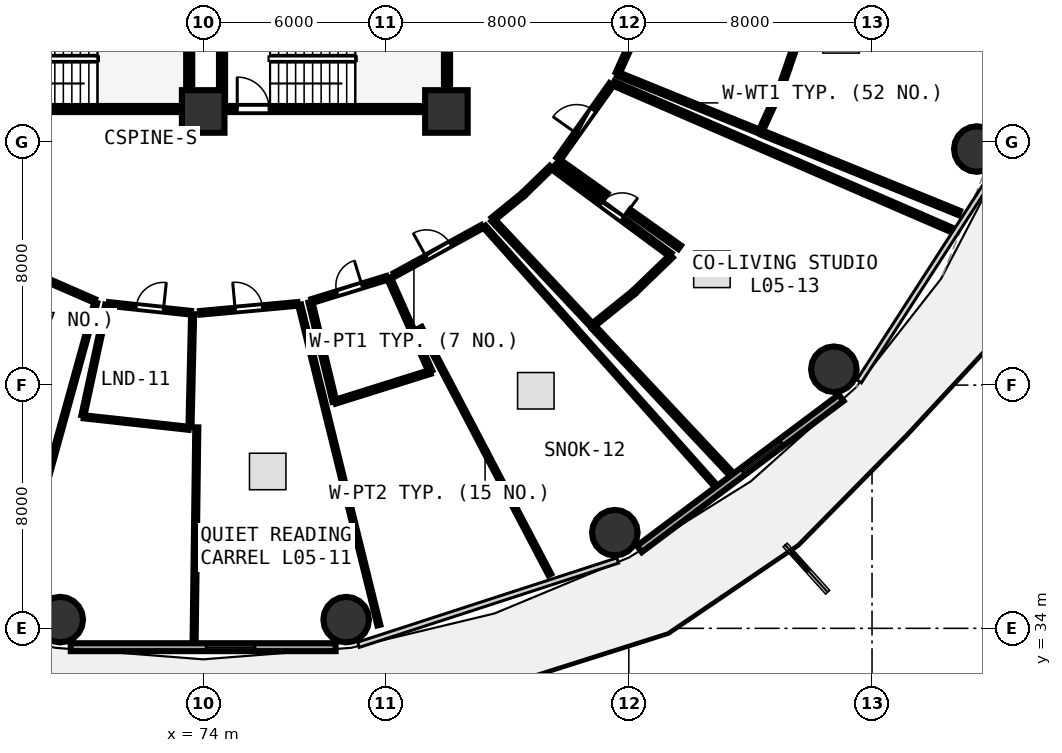
"""IFC4 building model, lengths in metres.
Left out: names, types, materials, properties, quantities, classifications, styles, units other than length and angle.
Written with IfcOpenShell. Run it as: python <this file> out.ifc"""

import sys

from ifc_helpers import new_model, si_unit, direction, frame, frame_2d, origin, origin_2d, place, context, subcontext, project, spatial, rectangle, circle, extrude, element, fill, save


model = new_model("IFC4")
c1 = context("Model", 3, precision=1e-05, world=origin(), true_north=direction((0.0, 1.0)))
c2 = subcontext(c1, "Body", "Model", "MODEL_VIEW")
j1 = project(units=[si_unit("LENGTHUNIT", "METRE"), si_unit("PLANEANGLEUNIT", "RADIAN")], contexts=[c1])
p1 = place(None, origin())
s1 = spatial("IfcSite", under=j1, at=p1, CompositionType="ELEMENT")
p2 = place(p1, origin())
s2 = spatial("IfcBuilding", under=s1, at=p2, CompositionType="ELEMENT")
p3 = place(p2, frame((0.0, 0.0, 22.5)))
s3 = spatial("IfcBuildingStorey", under=s2, at=p3, CompositionType="ELEMENT", Elevation=22.5)
for number, where, z_axis, x_axis in (
    (1, (74.0, 51.0, 0.0), (0.0, 0.0, 1.0), (1.0, 0.0, 0.0)),
    (2, (82.0, 51.0, 0.0), (0.0, 0.0, 1.0), (1.0, 0.0, 0.0)),
):
    element("IfcColumn", number, at=place(p3, frame(where, z_axis=z_axis, x_axis=x_axis)), inside=s3, PredefinedType="PILASTER", context=c2, shape_type="SweptSolid", body=[
        extrude(rectangle(XDim=1.4, YDim=1.4, at=origin_2d()), origin(), (0.0, 0.0, 1.0), 3.75),
    ])
for number, where, z_axis, x_axis in (
    (3, (69.298, 34.286, 0.0), (0.0, 0.0, 1.0), (1.0, 0.0, 0.0)),
    (4, (78.702, 34.286, 0.0), (0.0, 0.0, 1.0), (1.0, 0.0, 0.0)),
    (5, (87.54, 37.146, 0.0), (0.0, 0.0, 1.0), (1.0, 0.0, 0.0)),
    (6, (94.744, 42.522, 0.0), (0.0, 0.0, 1.0), (1.0, 0.0, 0.0)),
    (7, (99.447, 49.764, 0.0), (0.0, 0.0, 1.0), (1.0, 0.0, 0.0)),
):
    element("IfcColumn", number, at=place(p3, frame(where, z_axis=z_axis, x_axis=x_axis)), inside=s3, PredefinedType="COLUMN", context=c2, shape_type="SweptSolid", body=[
        extrude(circle(Radius=0.75, at=origin_2d()), origin(), (0.0, 0.0, 1.0), 3.75),
    ])
p4 = place(p3, frame((69.644, 33.38, 0.0), z_axis=(0.0, 0.0, 1.0), x_axis=(1.0, 0.0, 0.0)))
e8 = element("IfcWall", 8, at=p4, inside=s3, PredefinedType="SOLIDWALL", context=c2, shape_type="SweptSolid", body=[
    extrude(rectangle(XDim=8.712, YDim=0.26, at=frame_2d((4.356, 0.0))), origin(), (0.0, 0.0, 1.0), 3.475),
])
p5 = place(p4, frame((4.456, 0.0, 0.85)))
e9 = element("IfcOpeningElement", 9, at=p5, cuts=e8, PredefinedType="OPENING", context=c2, shape_type="SweptSolid", body=[
    extrude(rectangle(XDim=1.6, YDim=1.45, at=frame_2d((0.8, 0.725))), frame((0.0, 0.14, 0.0), z_axis=(0.0, -1.0, 0.0), x_axis=(1.0, 0.0, 0.0)), (0.0, 0.0, 1.0), 0.28),
])
p6 = place(p3, frame((88.349, 36.611, 0.0), z_axis=(0.0, 0.0, 1.0), x_axis=(0.80030733173, 0.599590005569, 0.0)))
e10 = element("IfcWall", 10, at=p6, inside=s3, PredefinedType="SOLIDWALL", context=c2, shape_type="SweptSolid", body=[
    extrude(rectangle(XDim=8.291, YDim=0.26, at=frame_2d((4.145, 0.0))), origin(), (0.0, 0.0, 1.0), 3.475),
])
p7 = place(p6, frame((4.245, 0.0, 0.85)))
e11 = element("IfcOpeningElement", 11, at=p7, cuts=e10, PredefinedType="OPENING", context=c2, shape_type="SweptSolid", body=[
    extrude(rectangle(XDim=1.6, YDim=1.45, at=frame_2d((0.8, 0.725))), frame((0.0, 0.14, 0.0), z_axis=(0.0, -1.0, 0.0), x_axis=(1.0, 0.0, 0.0)), (0.0, 0.0, 1.0), 0.28),
])
p8 = place(p3, frame((74.0, 51.08, 0.0), z_axis=(0.0, 0.0, 1.0), x_axis=(1.0, 0.0, 0.0)))
e12 = element("IfcWall", 12, at=p8, inside=s3, PredefinedType="SHEAR", context=c2, shape_type="SweptSolid", body=[
    extrude(rectangle(XDim=7.9, YDim=0.2, at=frame_2d((3.95, 0.0))), origin(), (0.0, 0.0, 1.0), 3.49),
])
p9 = place(p8, frame((1.12, 0.0, 0.0)))
e13 = element("IfcOpeningElement", 13, at=p9, cuts=e12, PredefinedType="OPENING", context=c2, shape_type="SweptSolid", body=[
    extrude(rectangle(XDim=1.05, YDim=2.1, at=frame_2d((0.525, 1.05))), frame((0.0, 0.11, 0.0), z_axis=(0.0, -1.0, 0.0), x_axis=(1.0, 0.0, 0.0)), (0.0, 0.0, 1.0), 0.22),
])
for number, where, z_axis, x_axis in (
    (14, (82.02, 51.2, 0.0), (0.0, 0.0, 1.0), (0.0, 1.0, 0.0)),
    (15, (74.62, 54.27, 0.0), (0.0, 0.0, 1.0), (0.0, -1.0, 0.0)),
):
    element("IfcWall", number, at=place(p3, frame(where, z_axis=z_axis, x_axis=x_axis)), inside=s3, PredefinedType="SHEAR", context=c2, shape_type="SweptSolid", body=[
        extrude(rectangle(XDim=3.07, YDim=0.2, at=frame_2d((1.535, 0.0))), origin(), (0.0, 0.0, 1.0), 3.49),
    ])
p10 = place(p3, frame((66.26, 51.08, 0.0), z_axis=(0.0, 0.0, 1.0), x_axis=(1.0, 0.0, 0.0)))
e16 = element("IfcWall", 16, at=p10, inside=s3, PredefinedType="SHEAR", context=c2, shape_type="SweptSolid", body=[
    extrude(rectangle(XDim=7.16, YDim=0.2, at=frame_2d((3.58, 0.0))), origin(), (0.0, 0.0, 1.0), 3.49),
])
p11 = place(p3, frame((73.54, 51.2, 0.0), z_axis=(0.0, 0.0, 1.0), x_axis=(0.0, 1.0, 0.0)))
e17 = element("IfcWall", 17, at=p11, inside=s3, PredefinedType="SHEAR", context=c2, shape_type="SweptSolid", body=[
    extrude(rectangle(XDim=3.07, YDim=0.2, at=frame_2d((1.535, 0.0))), origin(), (0.0, 0.0, 1.0), 3.49),
])
p12 = place(p3, frame((64.828, 47.217, 0.0), z_axis=(0.0, 0.0, 1.0), x_axis=(0.916419655578, -0.400218708797, 0.0)))
e18 = element("IfcWall", 18, at=p12, inside=s3, PredefinedType="PARTITIONING", context=c2, shape_type="SweptSolid", body=[
    extrude(rectangle(XDim=6.104, YDim=0.12, at=frame_2d((3.052, 0.0))), origin(), (0.0, 0.0, 1.0), 2.875),
])
p13 = place(p12, frame((2.602, 0.0, 0.0)))
e19 = element("IfcOpeningElement", 19, at=p13, cuts=e18, PredefinedType="OPENING", context=c2, shape_type="SweptSolid", body=[
    extrude(rectangle(XDim=0.9, YDim=2.08, at=frame_2d((0.45, 1.04))), frame((0.0, 0.07, 0.0), z_axis=(0.0, -1.0, 0.0), x_axis=(1.0, 0.0, 0.0)), (0.0, 0.0, 1.0), 0.14),
])
p14 = place(p3, frame((70.895, 44.67, 0.0), z_axis=(0.0, 0.0, 1.0), x_axis=(0.994302004983, -0.106599825921, 0.0)))
e20 = element("IfcWall", 20, at=p14, inside=s3, PredefinedType="PARTITIONING", context=c2, shape_type="SweptSolid", body=[
    extrude(rectangle(XDim=2.714, YDim=0.12, at=frame_2d((1.357, 0.0))), origin(), (0.0, 0.0, 1.0), 3.235),
])
p15 = place(p14, frame((0.907, 0.0, 0.0)))
e21 = element("IfcOpeningElement", 21, at=p15, cuts=e20, PredefinedType="OPENING", context=c2, shape_type="SweptSolid", body=[
    extrude(rectangle(XDim=0.9, YDim=2.08, at=frame_2d((0.45, 1.04))), frame((0.0, 0.07, 0.0), z_axis=(0.0, -1.0, 0.0), x_axis=(1.0, 0.0, 0.0)), (0.0, 0.0, 1.0), 0.14),
])
p16 = place(p3, frame((73.897, 44.376, 0.0), z_axis=(0.0, 0.0, 1.0), x_axis=(0.995829610124, 0.091232601628, 0.0)))
e22 = element("IfcWall", 22, at=p16, inside=s3, PredefinedType="PARTITIONING", context=c2, shape_type="SweptSolid", body=[
    extrude(rectangle(XDim=3.222, YDim=0.12, at=frame_2d((1.611, 0.0))), origin(), (0.0, 0.0, 1.0), 3.235),
])
p17 = place(p16, frame((1.161, 0.0, 0.0)))
e23 = element("IfcOpeningElement", 23, at=p17, cuts=e22, PredefinedType="OPENING", context=c2, shape_type="SweptSolid", body=[
    extrude(rectangle(XDim=0.9, YDim=2.08, at=frame_2d((0.45, 1.04))), frame((0.0, 0.07, 0.0), z_axis=(0.0, -1.0, 0.0), x_axis=(1.0, 0.0, 0.0)), (0.0, 0.0, 1.0), 0.14),
])
p18 = place(p3, frame((77.58, 44.768, 0.0), z_axis=(0.0, 0.0, 1.0), x_axis=(0.955754448098, 0.294165659011, 0.0)))
e24 = element("IfcWall", 24, at=p18, inside=s3, PredefinedType="PLUMBINGWALL", context=c2, shape_type="SweptSolid", body=[
    extrude(rectangle(XDim=2.579, YDim=0.13, at=frame_2d((1.29, 0.0))), origin(), (0.0, 0.0, 1.0), 3.235),
])
p19 = place(p18, frame((0.86, 0.0, 0.0)))
e25 = element("IfcOpeningElement", 25, at=p19, cuts=e24, PredefinedType="OPENING", context=c2, shape_type="SweptSolid", body=[
    extrude(rectangle(XDim=0.86, YDim=2.05, at=frame_2d((0.43, 1.025))), frame((0.0, 0.075, 0.0), z_axis=(0.0, -1.0, 0.0), x_axis=(1.0, 0.0, 0.0)), (0.0, 0.0, 1.0), 0.15),
])
p20 = place(p3, frame((80.299, 45.632, 0.0), z_axis=(0.0, 0.0, 1.0), x_axis=(0.876387079092, 0.481607399861, 0.0)))
e26 = element("IfcWall", 26, at=p20, inside=s3, PredefinedType="PARTITIONING", context=c2, shape_type="SweptSolid", body=[
    extrude(rectangle(XDim=3.281, YDim=0.12, at=frame_2d((1.641, 0.0))), origin(), (0.0, 0.0, 1.0), 2.875),
])
p21 = place(p20, frame((1.191, 0.0, 0.0)))
e27 = element("IfcOpeningElement", 27, at=p21, cuts=e26, PredefinedType="OPENING", context=c2, shape_type="SweptSolid", body=[
    extrude(rectangle(XDim=0.9, YDim=2.08, at=frame_2d((0.45, 1.04))), frame((0.0, 0.07, 0.0), z_axis=(0.0, -1.0, 0.0), x_axis=(1.0, 0.0, 0.0)), (0.0, 0.0, 1.0), 0.14),
])
p22 = place(p3, frame((85.506, 49.143, 0.0), z_axis=(0.0, 0.0, 1.0), x_axis=(0.80412644244, -0.594458295063, 0.0)))
e28 = element("IfcWall", 28, at=p22, inside=s3, PredefinedType="PLUMBINGWALL", context=c2, shape_type="SweptSolid", body=[
    extrude(rectangle(XDim=4.799, YDim=0.13, at=frame_2d((2.399, 0.0))), origin(), (0.0, 0.0, 1.0), 2.875),
])
p23 = place(p22, frame((1.969, 0.0, 0.0)))
e29 = element("IfcOpeningElement", 29, at=p23, cuts=e28, PredefinedType="OPENING", context=c2, shape_type="SweptSolid", body=[
    extrude(rectangle(XDim=0.86, YDim=2.05, at=frame_2d((0.43, 1.025))), frame((0.0, 0.075, 0.0), z_axis=(0.0, -1.0, 0.0), x_axis=(1.0, 0.0, 0.0)), (0.0, 0.0, 1.0), 0.15),
])
p24 = place(p3, frame((85.686, 49.438, 0.0), z_axis=(0.0, 0.0, 1.0), x_axis=(0.579107689823, 0.815251055557, 0.0)))
e30 = element("IfcWall", 30, at=p24, inside=s3, PredefinedType="PARTITIONING", context=c2, shape_type="SweptSolid", body=[
    extrude(rectangle(XDim=3.005, YDim=0.15, at=frame_2d((1.503, 0.0))), origin(), (0.0, 0.0, 1.0), 2.875),
])
p25 = place(p24, frame((1.028, 0.0, 0.0)))
e31 = element("IfcOpeningElement", 31, at=p25, cuts=e30, PredefinedType="OPENING", context=c2, shape_type="SweptSolid", body=[
    extrude(rectangle(XDim=0.95, YDim=2.08, at=frame_2d((0.475, 1.04))), frame((0.0, 0.085, 0.0), z_axis=(0.0, -1.0, 0.0), x_axis=(1.0, 0.0, 0.0)), (0.0, 0.0, 1.0), 0.17),
])
p26 = place(p3, frame((70.466, 44.711, 0.0), z_axis=(0.0, 0.0, 1.0), x_axis=(-0.26671307518, -0.963775977875, 0.0)))
e32 = element("IfcWall", 32, at=p26, inside=s3, PredefinedType="PARTITIONING", context=c2, shape_type="SweptSolid", body=[
    extrude(rectangle(XDim=10.865, YDim=0.1, at=frame_2d((5.432, 0.0))), origin(), (0.0, 0.0, 1.0), 2.875),
])
p27 = place(p3, frame((73.652, 44.334, 0.0), z_axis=(0.0, 0.0, 1.0), x_axis=(-0.02316715399, -0.99973160547, 0.0)))
e33 = element("IfcWall", 33, at=p27, inside=s3, PredefinedType="PARTITIONING", context=c2, shape_type="SweptSolid", body=[
    extrude(rectangle(XDim=3.72, YDim=0.1, at=frame_2d((1.86, 0.0))), origin(), (0.0, 0.0, 1.0), 3.175),
])
p28 = place(p3, frame((73.525, 40.579, 0.0), z_axis=(0.0, 0.0, 1.0), x_axis=(-0.994070147468, 0.108740709544, 0.0)))
e34 = element("IfcWall", 34, at=p28, inside=s3, PredefinedType="PARTITIONING", context=c2, shape_type="SweptSolid", body=[
    extrude(rectangle(XDim=3.471, YDim=0.1, at=frame_2d((1.735, 0.0))), origin(), (0.0, 0.0, 1.0), 3.175),
])
p29 = place(p3, frame((70.043, 41.0, 0.0), z_axis=(0.0, 0.0, 1.0), x_axis=(0.210519412271, 0.977589677246, 0.0)))
e35 = element("IfcWall", 35, at=p29, inside=s3, PredefinedType="PARTITIONING", context=c2, shape_type="SweptSolid", body=[
    extrude(rectangle(XDim=3.72, YDim=0.1, at=frame_2d((1.86, 0.0))), origin(), (0.0, 0.0, 1.0), 3.175),
])
p30 = place(p3, frame((77.175, 44.637, 0.0), z_axis=(0.0, 0.0, 1.0), x_axis=(0.239971369295, -0.970779965759, 0.0)))
e36 = element("IfcWall", 36, at=p30, inside=s3, PredefinedType="PARTITIONING", context=c2, shape_type="SweptSolid", body=[
    extrude(rectangle(XDim=10.846, YDim=0.1, at=frame_2d((5.423, 0.0))), origin(), (0.0, 0.0, 1.0), 2.875),
])
p31 = place(p3, frame((73.701, 33.561, 0.0), z_axis=(0.0, 0.0, 1.0), x_axis=(0.012537113793, 0.9999214073, 0.0)))
e37 = element("IfcWall", 37, at=p31, inside=s3, PredefinedType="PARTITIONING", context=c2, shape_type="SweptSolid", body=[
    extrude(rectangle(XDim=7.049, YDim=0.1, at=frame_2d((3.525, 0.0))), origin(), (0.0, 0.0, 1.0), 2.875),
])
p32 = place(p3, frame((80.111, 45.526, 0.0), z_axis=(0.0, 0.0, 1.0), x_axis=(0.405936178007, -0.913901427608, 0.0)))
e38 = element("IfcWall", 38, at=p32, inside=s3, PredefinedType="PLUMBINGWALL", context=c2, shape_type="SweptSolid", body=[
    extrude(rectangle(XDim=3.36, YDim=0.13, at=frame_2d((1.68, 0.0))), origin(), (0.0, 0.0, 1.0), 2.875),
])
p33 = place(p3, frame((81.464, 42.431, 0.0), z_axis=(0.0, 0.0, 1.0), x_axis=(-0.954175708416, -0.299246917226, 0.0)))
e39 = element("IfcWall", 39, at=p33, inside=s3, PredefinedType="PLUMBINGWALL", context=c2, shape_type="SweptSolid", body=[
    extrude(rectangle(XDim=3.275, YDim=0.13, at=frame_2d((1.637, 0.0))), origin(), (0.0, 0.0, 1.0), 2.875),
])
p34 = place(p3, frame((78.315, 41.464, 0.0), z_axis=(0.0, 0.0, 1.0), x_axis=(-0.234406131581, 0.972138758345, 0.0)))
e40 = element("IfcWall", 40, at=p34, inside=s3, PredefinedType="PLUMBINGWALL", context=c2, shape_type="SweptSolid", body=[
    extrude(rectangle(XDim=3.36, YDim=0.13, at=frame_2d((1.68, 0.0))), origin(), (0.0, 0.0, 1.0), 3.235),
])
p35 = place(p3, frame((83.254, 47.211, 0.0), z_axis=(0.0, 0.0, 1.0), x_axis=(0.66580890104, -0.746122313897, 0.0)))
e41 = element("IfcWall", 41, at=p35, inside=s3, PredefinedType="PARTITIONING", context=c2, shape_type="SweptSolid", body=[
    extrude(rectangle(XDim=11.399, YDim=0.1, at=frame_2d((5.7, 0.0))), origin(), (0.0, 0.0, 1.0), 2.875),
])
p36 = place(p3, frame((85.401, 35.769, 0.0), z_axis=(0.0, 0.0, 1.0), x_axis=(-0.464308397246, 0.885673592384, 0.0)))
e42 = element("IfcWall", 42, at=p36, inside=s3, PredefinedType="PARTITIONING", context=c2, shape_type="SweptSolid", body=[
    extrude(rectangle(XDim=9.17, YDim=0.1, at=frame_2d((4.585, 0.0))), origin(), (0.0, 0.0, 1.0), 2.875),
])
p37 = place(p3, frame((83.53, 47.461, 0.0), z_axis=(0.0, 0.0, 1.0), x_axis=(0.77596084644, 0.63078107517, 0.0)))
e43 = element("IfcWall", 43, at=p37, inside=s3, PredefinedType="PLUMBINGWALL", context=c2, shape_type="SweptSolid", body=[
    extrude(rectangle(XDim=1.268, YDim=0.13, at=frame_2d((0.634, 0.0))), origin(), (0.0, 0.0, 1.0), 2.875),
])
p38 = place(p3, frame((84.543, 48.287, 0.0), z_axis=(0.0, 0.0, 1.0), x_axis=(0.715980731769, 0.698120041064, 0.0)))
e44 = element("IfcWall", 44, at=p38, inside=s3, PredefinedType="PLUMBINGWALL", context=c2, shape_type="SweptSolid", body=[
    extrude(rectangle(XDim=1.258, YDim=0.13, at=frame_2d((0.629, 0.0))), origin(), (0.0, 0.0, 1.0), 2.875),
])
p39 = place(p3, frame((89.399, 46.241, 0.0), z_axis=(0.0, 0.0, 1.0), x_axis=(-0.719664402118, -0.694322078234, 0.0)))
e45 = element("IfcWall", 45, at=p39, inside=s3, PredefinedType="PLUMBINGWALL", context=c2, shape_type="SweptSolid", body=[
    extrude(rectangle(XDim=1.696, YDim=0.13, at=frame_2d((0.848, 0.0))), origin(), (0.0, 0.0, 1.0), 2.875),
])
p40 = place(p3, frame((88.148, 45.038, 0.0), z_axis=(0.0, 0.0, 1.0), x_axis=(-0.778806140639, -0.627264693174, 0.0)))
e46 = element("IfcWall", 46, at=p40, inside=s3, PredefinedType="PLUMBINGWALL", context=c2, shape_type="SweptSolid", body=[
    extrude(rectangle(XDim=1.713, YDim=0.13, at=frame_2d((0.856, 0.0))), origin(), (0.0, 0.0, 1.0), 3.175),
])
p41 = place(p3, frame((86.785, 43.966, 0.0), z_axis=(0.0, 0.0, 1.0), x_axis=(-0.68469858897, 0.728826345753, 0.0)))
e47 = element("IfcWall", 47, at=p41, inside=s3, PredefinedType="PLUMBINGWALL", context=c2, shape_type="SweptSolid", body=[
    extrude(rectangle(XDim=4.758, YDim=0.13, at=frame_2d((2.379, 0.0))), origin(), (0.0, 0.0, 1.0), 2.875),
])
p42 = place(p3, frame((87.498, 51.921, 0.0), z_axis=(0.0, 0.0, 1.0), x_axis=(0.917695041134, -0.397285554077, 0.0)))
e48 = element("IfcWall", 48, at=p42, inside=s3, PredefinedType="PARTITIONING", context=c2, shape_type="SweptSolid", body=[
    extrude(rectangle(XDim=12.07, YDim=0.15, at=frame_2d((6.035, 0.0))), origin(), (0.0, 0.0, 1.0), 2.875),
])
p43 = place(p3, frame((91.368, 39.078, 0.0), z_axis=(0.0, 0.0, 1.0), x_axis=(-0.684296653493, 0.729203736975, 0.0)))
e49 = element("IfcWall", 49, at=p43, inside=s3, PredefinedType="PARTITIONING", context=c2, shape_type="SweptSolid", body=[
    extrude(rectangle(XDim=6.6, YDim=0.15, at=frame_2d((3.3, 0.0))), origin(), (0.0, 0.0, 1.0), 2.875),
])
p44 = place(p3, frame((89.671, 46.533, 0.0), z_axis=(0.0, 0.0, 1.0), x_axis=(-0.815281399299, 0.579064970411, 0.0)))
e50 = element("IfcWall", 50, at=p44, inside=s3, PredefinedType="PARTITIONING", context=c2, shape_type="SweptSolid", body=[
    extrude(rectangle(XDim=2.042, YDim=0.15, at=frame_2d((1.021, 0.0))), origin(), (0.0, 0.0, 1.0), 3.48),
])
p45 = place(p3, frame((87.256, 48.249, 0.0), z_axis=(0.0, 0.0, 1.0), x_axis=(-0.815270043711, 0.579080957922, 0.0)))
e51 = element("IfcWall", 51, at=p45, inside=s3, PredefinedType="PARTITIONING", context=c2, shape_type="SweptSolid", body=[
    extrude(rectangle(XDim=1.929, YDim=0.15, at=frame_2d((0.964, 0.0))), origin(), (0.0, 0.0, 1.0), 3.235),
])
p46 = place(p3, frame((87.628, 52.255, 0.0), z_axis=(0.0, 0.0, 1.0), x_axis=(0.4138937247, 0.910325208183, 0.0)))
e52 = element("IfcWall", 52, at=p46, inside=s3, PredefinedType="PLUMBINGWALL", context=c2, shape_type="SweptSolid", body=[
    extrude(rectangle(XDim=1.216, YDim=0.13, at=frame_2d((0.608, 0.0))), origin(), (0.0, 0.0, 1.0), 3.48),
])
p47 = place(p3, frame((93.559, 53.402, 0.0), z_axis=(0.0, 0.0, 1.0), x_axis=(-0.326356647952, -0.945246707657, 0.0)))
e53 = element("IfcWall", 53, at=p47, inside=s3, PredefinedType="PLUMBINGWALL", context=c2, shape_type="SweptSolid", body=[
    extrude(rectangle(XDim=1.624, YDim=0.13, at=frame_2d((0.812, 0.0))), origin(), (0.0, 0.0, 1.0), 3.48),
])
p48 = place(p3, frame((93.014, 51.83, 0.0), z_axis=(0.0, 0.0, 1.0), x_axis=(-0.41762687648, -0.908618617486, 0.0)))
e54 = element("IfcWall", 54, at=p48, inside=s3, PredefinedType="PLUMBINGWALL", context=c2, shape_type="SweptSolid", body=[
    extrude(rectangle(XDim=1.634, YDim=0.13, at=frame_2d((0.817, 0.0))), origin(), (0.0, 0.0, 1.0), 2.875),
])
p49 = place(p3, frame((92.304, 50.334, 0.0), z_axis=(0.0, 0.0, 1.0), x_axis=(-0.926504606816, 0.376283421835, 0.0)))
e55 = element("IfcWall", 55, at=p49, inside=s3, PredefinedType="PLUMBINGWALL", context=c2, shape_type="SweptSolid", body=[
    extrude(rectangle(XDim=5.036, YDim=0.13, at=frame_2d((2.518, 0.0))), origin(), (0.0, 0.0, 1.0), 2.875),
])
p50 = place(p3, frame((98.865, 47.664, 0.0), z_axis=(0.0, 0.0, 1.0), x_axis=(-0.926325178802, 0.376724917038, 0.0)))
e56 = element("IfcWall", 56, at=p50, inside=s3, PredefinedType="PARTITIONING", context=c2, shape_type="SweptSolid", body=[
    extrude(rectangle(XDim=6.983, YDim=0.15, at=frame_2d((3.492, 0.0))), origin(), (0.0, 0.0, 1.0), 2.875),
])
p51 = place(p5, origin())
e57 = element("IfcWindow", 57, at=p51, inside=s3, PartitioningType="SINGLE_PANEL", PredefinedType="WINDOW", context=c2, shape_type="SweptSolid", body=[
    extrude(rectangle(XDim=1.6, YDim=1.45, at=frame_2d((0.8, 0.725))), frame((0.0, 0.03, 0.0), z_axis=(0.0, -1.0, 0.0), x_axis=(1.0, 0.0, 0.0)), (0.0, 0.0, 1.0), 0.06),
])
fill(e9, e57)
p52 = place(p7, origin())
e58 = element("IfcWindow", 58, at=p52, inside=s3, PartitioningType="SINGLE_PANEL", PredefinedType="WINDOW", context=c2, shape_type="SweptSolid", body=[
    extrude(rectangle(XDim=1.6, YDim=1.45, at=frame_2d((0.8, 0.725))), frame((0.0, 0.03, 0.0), z_axis=(0.0, -1.0, 0.0), x_axis=(1.0, 0.0, 0.0)), (0.0, 0.0, 1.0), 0.06),
])
fill(e11, e58)
p53 = place(p9, origin())
e59 = element("IfcDoor", 59, at=p53, inside=s3, OperationType="SINGLE_SWING_LEFT", PredefinedType="DOOR", context=c2, shape_type="SweptSolid", body=[
    extrude(rectangle(XDim=1.05, YDim=2.1, at=frame_2d((0.525, 1.05))), frame((0.0, 0.025, 0.0), z_axis=(0.0, -1.0, 0.0), x_axis=(1.0, 0.0, 0.0)), (0.0, 0.0, 1.0), 0.05),
])
fill(e13, e59)
p54 = place(p15, origin())
e60 = element("IfcDoor", 60, at=p54, inside=s3, OperationType="SINGLE_SWING_RIGHT", PredefinedType="DOOR", context=c2, shape_type="SweptSolid", body=[
    extrude(rectangle(XDim=0.9, YDim=2.08, at=frame_2d((0.45, 1.04))), frame((0.0, 0.025, 0.0), z_axis=(0.0, -1.0, 0.0), x_axis=(1.0, 0.0, 0.0)), (0.0, 0.0, 1.0), 0.05),
])
fill(e21, e60)
p55 = place(p17, origin())
e61 = element("IfcDoor", 61, at=p55, inside=s3, OperationType="SINGLE_SWING_LEFT", PredefinedType="DOOR", context=c2, shape_type="SweptSolid", body=[
    extrude(rectangle(XDim=0.9, YDim=2.08, at=frame_2d((0.45, 1.04))), frame((0.0, 0.025, 0.0), z_axis=(0.0, -1.0, 0.0), x_axis=(1.0, 0.0, 0.0)), (0.0, 0.0, 1.0), 0.05),
])
fill(e23, e61)
p56 = place(p19, origin())
e62 = element("IfcDoor", 62, at=p56, inside=s3, OperationType="SINGLE_SWING_RIGHT", PredefinedType="DOOR", context=c2, shape_type="SweptSolid", body=[
    extrude(rectangle(XDim=0.86, YDim=2.05, at=frame_2d((0.43, 1.025))), frame((0.0, 0.025, 0.0), z_axis=(0.0, -1.0, 0.0), x_axis=(1.0, 0.0, 0.0)), (0.0, 0.0, 1.0), 0.05),
])
fill(e25, e62)
p57 = place(p21, origin())
e63 = element("IfcDoor", 63, at=p57, inside=s3, OperationType="SINGLE_SWING_LEFT", PredefinedType="DOOR", context=c2, shape_type="SweptSolid", body=[
    extrude(rectangle(XDim=0.9, YDim=2.08, at=frame_2d((0.45, 1.04))), frame((0.0, 0.025, 0.0), z_axis=(0.0, -1.0, 0.0), x_axis=(1.0, 0.0, 0.0)), (0.0, 0.0, 1.0), 0.05),
])
fill(e27, e63)
p58 = place(p23, origin())
e64 = element("IfcDoor", 64, at=p58, inside=s3, OperationType="SINGLE_SWING_RIGHT", PredefinedType="DOOR", context=c2, shape_type="SweptSolid", body=[
    extrude(rectangle(XDim=0.86, YDim=2.05, at=frame_2d((0.43, 1.025))), frame((0.0, 0.025, 0.0), z_axis=(0.0, -1.0, 0.0), x_axis=(1.0, 0.0, 0.0)), (0.0, 0.0, 1.0), 0.05),
])
fill(e29, e64)
p59 = place(p25, origin())
e65 = element("IfcDoor", 65, at=p59, inside=s3, OperationType="SINGLE_SWING_LEFT", PredefinedType="DOOR", context=c2, shape_type="SweptSolid", body=[
    extrude(rectangle(XDim=0.95, YDim=2.08, at=frame_2d((0.475, 1.04))), frame((0.0, 0.025, 0.0), z_axis=(0.0, -1.0, 0.0), x_axis=(1.0, 0.0, 0.0)), (0.0, 0.0, 1.0), 0.05),
])
fill(e31, e65)
save(model, sys.argv[1])
